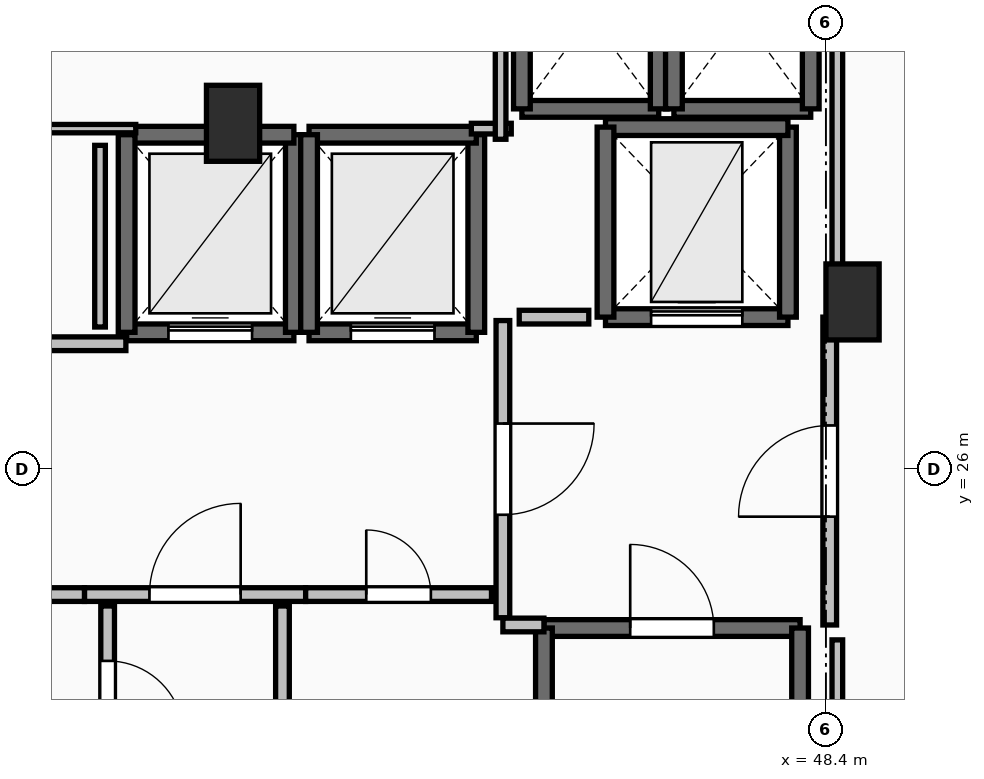
"""IFC4 building model, lengths in metres.
Left out: names, types, materials, properties, quantities, classifications, styles, units other than length and angle.
Written with IfcOpenShell. Run it as: python <this file> out.ifc"""

import sys

from ifc_helpers import new_model, si_unit, direction, frame, frame_2d, origin, origin_2d, place, context, subcontext, project, spatial, rectangle, extrude, element, fill, save


model = new_model("IFC4")
c1 = context("Model", 3, precision=1e-05, world=origin(), true_north=direction((0.0, 1.0)))
c2 = subcontext(c1, "Body", "Model", "MODEL_VIEW")
j1 = project(units=[si_unit("LENGTHUNIT", "METRE"), si_unit("PLANEANGLEUNIT", "RADIAN")], contexts=[c1])
p1 = place(None, origin())
s1 = spatial("IfcSite", under=j1, at=p1, CompositionType="ELEMENT")
p2 = place(p1, origin())
s2 = spatial("IfcBuilding", under=s1, at=p2, CompositionType="ELEMENT")
p3 = place(p2, frame((0.0, 0.0, 266.2)))
s3 = spatial("IfcBuildingStorey", under=s2, at=p3, CompositionType="ELEMENT", Elevation=266.2)
for number, where, z_axis, x_axis in (
    (1, (48.75, 28.2, 0.0), (0.0, 0.0, 1.0), (1.0, 0.0, 0.0)),
    (2, (40.6, 30.55, 0.0), (0.0, 0.0, 1.0), (1.0, 0.0, 0.0)),
):
    element("IfcColumn", number, at=place(p3, frame(where, z_axis=z_axis, x_axis=x_axis)), inside=s3, PredefinedType="PILASTER", context=c2, shape_type="SweptSolid", body=[
        extrude(rectangle(XDim=0.7, YDim=1.0, at=origin_2d()), origin(), (0.0, 0.0, 1.0), 3.55),
    ])
p4 = place(p3, frame((44.69, 23.91, 0.0), z_axis=(0.0, 0.0, 1.0), x_axis=(1.0, 0.0, 0.0)))
e3 = element("IfcWall", 3, at=p4, inside=s3, PredefinedType="SOLIDWALL", context=c2, shape_type="SweptSolid", body=[
    extrude(rectangle(XDim=3.37, YDim=0.22, at=frame_2d((1.685, 0.0))), origin(), (0.0, 0.0, 1.0), 3.29),
])
p5 = place(p4, frame((1.135, 0.0, 0.0)))
e4 = element("IfcOpeningElement", 4, at=p5, cuts=e3, PredefinedType="OPENING", context=c2, shape_type="SweptSolid", body=[
    extrude(rectangle(XDim=1.1, YDim=2.15, at=frame_2d((0.55, 1.075))), frame((0.0, 0.125, 0.0), z_axis=(0.0, -1.0, 0.0), x_axis=(1.0, 0.0, 0.0)), (0.0, 0.0, 1.0), 0.25),
])
for number, where, z_axis, x_axis in (
    (5, (48.06, 23.91, 0.0), (0.0, 0.0, 1.0), (0.0, -1.0, 0.0)),
    (6, (44.69, 16.49, 0.0), (0.0, 0.0, 1.0), (0.0, 1.0, 0.0)),
):
    element("IfcWall", number, at=place(p3, frame(where, z_axis=z_axis, x_axis=x_axis)), inside=s3, PredefinedType="SOLIDWALL", context=c2, shape_type="SweptSolid", body=[
        extrude(rectangle(XDim=7.42, YDim=0.22, at=frame_2d((3.71, 0.0))), origin(), (0.0, 0.0, 1.0), 3.29),
    ])
p6 = place(p3, frame((39.2, 27.8, 0.0), z_axis=(0.0, 0.0, 1.0), x_axis=(1.0, 0.0, 0.0)))
e7 = element("IfcWall", 7, at=p6, inside=s3, PredefinedType="SOLIDWALL", context=c2, shape_type="SweptSolid", body=[
    extrude(rectangle(XDim=2.2, YDim=0.22, at=frame_2d((1.1, 0.0))), origin(), (0.0, 0.0, 1.0), 3.29),
])
p7 = place(p6, frame((0.55, 0.0, 0.0)))
e8 = element("IfcOpeningElement", 8, at=p7, cuts=e7, PredefinedType="OPENING", context=c2, shape_type="SweptSolid", body=[
    extrude(rectangle(XDim=1.1, YDim=2.2, at=frame_2d((0.55, 1.1))), frame((0.0, 0.125, 0.0), z_axis=(0.0, -1.0, 0.0), x_axis=(1.0, 0.0, 0.0)), (0.0, 0.0, 1.0), 0.25),
])
p8 = place(p3, frame((41.4, 27.8, 0.0), z_axis=(0.0, 0.0, 1.0), x_axis=(0.0, 1.0, 0.0)))
e9 = element("IfcWall", 9, at=p8, inside=s3, PredefinedType="SOLIDWALL", context=c2, shape_type="SweptSolid", body=[
    extrude(rectangle(XDim=2.6, YDim=0.22, at=frame_2d((1.3, 0.0))), origin(), (0.0, 0.0, 1.0), 3.29),
])
p9 = place(p3, frame((41.4, 30.4, 0.0), z_axis=(0.0, 0.0, 1.0), x_axis=(-1.0, 0.0, 0.0)))
e10 = element("IfcWall", 10, at=p9, inside=s3, PredefinedType="SOLIDWALL", context=c2, shape_type="SweptSolid", body=[
    extrude(rectangle(XDim=2.2, YDim=0.22, at=frame_2d((1.1, 0.0))), origin(), (0.0, 0.0, 1.0), 3.29),
])
p10 = place(p3, frame((39.2, 30.4, 0.0), z_axis=(0.0, 0.0, 1.0), x_axis=(0.0, -1.0, 0.0)))
e11 = element("IfcWall", 11, at=p10, inside=s3, PredefinedType="SOLIDWALL", context=c2, shape_type="SweptSolid", body=[
    extrude(rectangle(XDim=2.6, YDim=0.22, at=frame_2d((1.3, 0.0))), origin(), (0.0, 0.0, 1.0), 3.29),
])
p11 = place(p3, frame((41.6, 27.8, 0.0), z_axis=(0.0, 0.0, 1.0), x_axis=(1.0, 0.0, 0.0)))
e12 = element("IfcWall", 12, at=p11, inside=s3, PredefinedType="SOLIDWALL", context=c2, shape_type="SweptSolid", body=[
    extrude(rectangle(XDim=2.2, YDim=0.22, at=frame_2d((1.1, 0.0))), origin(), (0.0, 0.0, 1.0), 3.29),
])
p12 = place(p11, frame((0.55, 0.0, 0.0)))
e13 = element("IfcOpeningElement", 13, at=p12, cuts=e12, PredefinedType="OPENING", context=c2, shape_type="SweptSolid", body=[
    extrude(rectangle(XDim=1.1, YDim=2.2, at=frame_2d((0.55, 1.1))), frame((0.0, 0.125, 0.0), z_axis=(0.0, -1.0, 0.0), x_axis=(1.0, 0.0, 0.0)), (0.0, 0.0, 1.0), 0.25),
])
p13 = place(p3, frame((43.8, 27.8, 0.0), z_axis=(0.0, 0.0, 1.0), x_axis=(0.0, 1.0, 0.0)))
e14 = element("IfcWall", 14, at=p13, inside=s3, PredefinedType="SOLIDWALL", context=c2, shape_type="SweptSolid", body=[
    extrude(rectangle(XDim=2.6, YDim=0.22, at=frame_2d((1.3, 0.0))), origin(), (0.0, 0.0, 1.0), 3.29),
])
p14 = place(p3, frame((43.8, 30.4, 0.0), z_axis=(0.0, 0.0, 1.0), x_axis=(-1.0, 0.0, 0.0)))
e15 = element("IfcWall", 15, at=p14, inside=s3, PredefinedType="SOLIDWALL", context=c2, shape_type="SweptSolid", body=[
    extrude(rectangle(XDim=2.2, YDim=0.22, at=frame_2d((1.1, 0.0))), origin(), (0.0, 0.0, 1.0), 3.29),
])
p15 = place(p3, frame((41.6, 30.4, 0.0), z_axis=(0.0, 0.0, 1.0), x_axis=(0.0, -1.0, 0.0)))
e16 = element("IfcWall", 16, at=p15, inside=s3, PredefinedType="SOLIDWALL", context=c2, shape_type="SweptSolid", body=[
    extrude(rectangle(XDim=2.6, YDim=0.22, at=frame_2d((1.3, 0.0))), origin(), (0.0, 0.0, 1.0), 3.29),
])
p16 = place(p3, frame((44.4, 30.74, 0.0), z_axis=(0.0, 0.0, 1.0), x_axis=(1.0, 0.0, 0.0)))
e17 = element("IfcWall", 17, at=p16, inside=s3, PredefinedType="SOLIDWALL", context=c2, shape_type="SweptSolid", body=[
    extrude(rectangle(XDim=1.8, YDim=0.22, at=frame_2d((0.9, 0.0))), origin(), (0.0, 0.0, 1.0), 3.29),
])
for number, where, z_axis, x_axis in (
    (18, (46.2, 30.74, 0.0), (0.0, 0.0, 1.0), (0.0, 1.0, 0.0)),
    (19, (44.4, 33.16, 0.0), (0.0, 0.0, 1.0), (0.0, -1.0, 0.0)),
):
    element("IfcWall", number, at=place(p3, frame(where, z_axis=z_axis, x_axis=x_axis)), inside=s3, PredefinedType="SOLIDWALL", context=c2, shape_type="SweptSolid", body=[
        extrude(rectangle(XDim=2.42, YDim=0.22, at=frame_2d((1.21, 0.0))), origin(), (0.0, 0.0, 1.0), 3.29),
    ])
p17 = place(p3, frame((46.4, 30.74, 0.0), z_axis=(0.0, 0.0, 1.0), x_axis=(1.0, 0.0, 0.0)))
e20 = element("IfcWall", 20, at=p17, inside=s3, PredefinedType="SOLIDWALL", context=c2, shape_type="SweptSolid", body=[
    extrude(rectangle(XDim=1.8, YDim=0.22, at=frame_2d((0.9, 0.0))), origin(), (0.0, 0.0, 1.0), 3.29),
])
for number, where, z_axis, x_axis in (
    (21, (48.2, 30.74, 0.0), (0.0, 0.0, 1.0), (0.0, 1.0, 0.0)),
    (22, (46.4, 33.16, 0.0), (0.0, 0.0, 1.0), (0.0, -1.0, 0.0)),
):
    element("IfcWall", number, at=place(p3, frame(where, z_axis=z_axis, x_axis=x_axis)), inside=s3, PredefinedType="SOLIDWALL", context=c2, shape_type="SweptSolid", body=[
        extrude(rectangle(XDim=2.42, YDim=0.22, at=frame_2d((1.21, 0.0))), origin(), (0.0, 0.0, 1.0), 3.29),
    ])
p18 = place(p3, frame((45.5, 28.0, 0.0), z_axis=(0.0, 0.0, 1.0), x_axis=(1.0, 0.0, 0.0)))
e23 = element("IfcWall", 23, at=p18, inside=s3, PredefinedType="SHEAR", context=c2, shape_type="SweptSolid", body=[
    extrude(rectangle(XDim=2.4, YDim=0.22, at=frame_2d((1.2, 0.0))), origin(), (0.0, 0.0, 1.0), 3.29),
])
p19 = place(p18, frame((0.6, 0.0, 0.0)))
e24 = element("IfcOpeningElement", 24, at=p19, cuts=e23, PredefinedType="OPENING", context=c2, shape_type="SweptSolid", body=[
    extrude(rectangle(XDim=1.2, YDim=2.2, at=frame_2d((0.6, 1.1))), frame((0.0, 0.125, 0.0), z_axis=(0.0, -1.0, 0.0), x_axis=(1.0, 0.0, 0.0)), (0.0, 0.0, 1.0), 0.25),
])
p20 = place(p3, frame((47.9, 28.0, 0.0), z_axis=(0.0, 0.0, 1.0), x_axis=(0.0, 1.0, 0.0)))
e25 = element("IfcWall", 25, at=p20, inside=s3, PredefinedType="SHEAR", context=c2, shape_type="SweptSolid", body=[
    extrude(rectangle(XDim=2.5, YDim=0.22, at=frame_2d((1.25, 0.0))), origin(), (0.0, 0.0, 1.0), 3.29),
])
p21 = place(p3, frame((47.9, 30.5, 0.0), z_axis=(0.0, 0.0, 1.0), x_axis=(-1.0, 0.0, 0.0)))
e26 = element("IfcWall", 26, at=p21, inside=s3, PredefinedType="SHEAR", context=c2, shape_type="SweptSolid", body=[
    extrude(rectangle(XDim=2.4, YDim=0.22, at=frame_2d((1.2, 0.0))), origin(), (0.0, 0.0, 1.0), 3.29),
])
p22 = place(p3, frame((45.5, 30.5, 0.0), z_axis=(0.0, 0.0, 1.0), x_axis=(0.0, -1.0, 0.0)))
e27 = element("IfcWall", 27, at=p22, inside=s3, PredefinedType="SHEAR", context=c2, shape_type="SweptSolid", body=[
    extrude(rectangle(XDim=2.5, YDim=0.22, at=frame_2d((1.25, 0.0))), origin(), (0.0, 0.0, 1.0), 3.29),
])
p23 = place(p3, frame((44.15, 27.955, 0.0), z_axis=(0.0, 0.0, 1.0), x_axis=(0.0, -1.0, 0.0)))
e28 = element("IfcWall", 28, at=p23, inside=s3, PredefinedType="PARTITIONING", context=c2, shape_type="SweptSolid", body=[
    extrude(rectangle(XDim=3.91, YDim=0.18, at=frame_2d((1.955, 0.0))), origin(), (0.0, 0.0, 1.0), 3.29),
])
p24 = place(p23, frame((1.355, 0.0, 0.0)))
e29 = element("IfcOpeningElement", 29, at=p24, cuts=e28, PredefinedType="OPENING", context=c2, shape_type="SweptSolid", body=[
    extrude(rectangle(XDim=1.2, YDim=2.15, at=frame_2d((0.6, 1.075))), frame((0.0, 0.105, 0.0), z_axis=(0.0, -1.0, 0.0), x_axis=(1.0, 0.0, 0.0)), (0.0, 0.0, 1.0), 0.21),
])
p25 = place(p3, frame((44.15, 23.95, 0.0), z_axis=(0.0, 0.0, 1.0), x_axis=(1.0, 0.0, 0.0)))
e30 = element("IfcWall", 30, at=p25, inside=s3, PredefinedType="PARTITIONING", context=c2, shape_type="SweptSolid", body=[
    extrude(rectangle(XDim=0.54, YDim=0.18, at=frame_2d((0.27, 0.0))), origin(), (0.0, 0.0, 1.0), 3.29),
])
p26 = place(p3, frame((48.45, 23.95, 0.0), z_axis=(0.0, 0.0, 1.0), x_axis=(0.0, 1.0, 0.0)))
e31 = element("IfcWall", 31, at=p26, inside=s3, PredefinedType="PARTITIONING", context=c2, shape_type="SweptSolid", body=[
    extrude(rectangle(XDim=4.05, YDim=0.18, at=frame_2d((2.025, 0.0))), origin(), (0.0, 0.0, 1.0), 3.29),
])
p27 = place(p26, frame((1.425, 0.0, 0.0)))
e32 = element("IfcOpeningElement", 32, at=p27, cuts=e31, PredefinedType="OPENING", context=c2, shape_type="SweptSolid", body=[
    extrude(rectangle(XDim=1.2, YDim=2.15, at=frame_2d((0.6, 1.075))), frame((0.0, 0.105, 0.0), z_axis=(0.0, -1.0, 0.0), x_axis=(1.0, 0.0, 0.0)), (0.0, 0.0, 1.0), 0.21),
])
p28 = place(p3, frame((38.645, 24.35, 0.0), z_axis=(0.0, 0.0, 1.0), x_axis=(1.0, 0.0, 0.0)))
e33 = element("IfcWall", 33, at=p28, inside=s3, PredefinedType="PARTITIONING", context=c2, shape_type="SweptSolid", body=[
    extrude(rectangle(XDim=2.91, YDim=0.18, at=frame_2d((1.455, 0.0))), origin(), (0.0, 0.0, 1.0), 3.29),
])
p29 = place(p28, frame((0.855, 0.0, 0.0)))
e34 = element("IfcOpeningElement", 34, at=p29, cuts=e33, PredefinedType="OPENING", context=c2, shape_type="SweptSolid", body=[
    extrude(rectangle(XDim=1.2, YDim=2.15, at=frame_2d((0.6, 1.075))), frame((0.0, 0.105, 0.0), z_axis=(0.0, -1.0, 0.0), x_axis=(1.0, 0.0, 0.0)), (0.0, 0.0, 1.0), 0.21),
])
p30 = place(p3, frame((41.555, 24.35, 0.0), z_axis=(0.0, 0.0, 1.0), x_axis=(1.0, 0.0, 0.0)))
e35 = element("IfcWall", 35, at=p30, inside=s3, PredefinedType="PARTITIONING", context=c2, shape_type="SweptSolid", body=[
    extrude(rectangle(XDim=2.445, YDim=0.18, at=frame_2d((1.223, 0.0))), origin(), (0.0, 0.0, 1.0), 3.29),
])
p31 = place(p30, frame((0.798, 0.0, 0.0)))
e36 = element("IfcOpeningElement", 36, at=p31, cuts=e35, PredefinedType="OPENING", context=c2, shape_type="SweptSolid", body=[
    extrude(rectangle(XDim=0.85, YDim=2.1, at=frame_2d((0.425, 1.05))), frame((0.0, 0.105, 0.0), z_axis=(0.0, -1.0, 0.0), x_axis=(1.0, 0.0, 0.0)), (0.0, 0.0, 1.0), 0.21),
])
p32 = place(p3, frame((39.19, 27.65, 0.0), z_axis=(0.0, 0.0, 1.0), x_axis=(-1.0, 0.0, 0.0)))
e37 = element("IfcWall", 37, at=p32, inside=s3, PredefinedType="PARTITIONING", context=c2, shape_type="SweptSolid", body=[
    extrude(rectangle(XDim=7.19, YDim=0.18, at=frame_2d((3.595, 0.0))), origin(), (0.0, 0.0, 1.0), 3.29),
])
p33 = place(p32, frame((3.095, 0.0, 0.0)))
e38 = element("IfcOpeningElement", 38, at=p33, cuts=e37, PredefinedType="OPENING", context=c2, shape_type="SweptSolid", body=[
    extrude(rectangle(XDim=1.0, YDim=2.15, at=frame_2d((0.5, 1.075))), frame((0.0, 0.105, 0.0), z_axis=(0.0, -1.0, 0.0), x_axis=(1.0, 0.0, 0.0)), (0.0, 0.0, 1.0), 0.21),
])
p34 = place(p3, frame((35.81, 24.35, 0.0), z_axis=(0.0, 0.0, 1.0), x_axis=(1.0, 0.0, 0.0)))
e39 = element("IfcWall", 39, at=p34, inside=s3, PredefinedType="PARTITIONING", context=c2, shape_type="SweptSolid", body=[
    extrude(rectangle(XDim=2.835, YDim=0.18, at=frame_2d((1.417, 0.0))), origin(), (0.0, 0.0, 1.0), 3.29),
])
p35 = place(p34, frame((0.917, 0.0, 0.0)))
e40 = element("IfcOpeningElement", 40, at=p35, cuts=e39, PredefinedType="OPENING", context=c2, shape_type="SweptSolid", body=[
    extrude(rectangle(XDim=1.0, YDim=2.15, at=frame_2d((0.5, 1.075))), frame((0.0, 0.105, 0.0), z_axis=(0.0, -1.0, 0.0), x_axis=(1.0, 0.0, 0.0)), (0.0, 0.0, 1.0), 0.21),
])
p36 = place(p3, frame((41.25, 20.305, 0.0), z_axis=(0.0, 0.0, 1.0), x_axis=(0.0, 1.0, 0.0)))
e41 = element("IfcWall", 41, at=p36, inside=s3, PredefinedType="PARTITIONING", context=c2, shape_type="SweptSolid", body=[
    extrude(rectangle(XDim=3.895, YDim=0.18, at=frame_2d((1.948, 0.0))), origin(), (0.0, 0.0, 1.0), 2.482),
])
p37 = place(p36, frame((1.522, 0.0, 0.0)))
e42 = element("IfcOpeningElement", 42, at=p37, cuts=e41, PredefinedType="OPENING", context=c2, shape_type="SweptSolid", body=[
    extrude(rectangle(XDim=0.85, YDim=2.1, at=frame_2d((0.425, 1.05))), frame((0.0, 0.105, 0.0), z_axis=(0.0, -1.0, 0.0), x_axis=(1.0, 0.0, 0.0)), (0.0, 0.0, 1.0), 0.21),
])
p38 = place(p3, frame((38.95, 24.2, 0.0), z_axis=(0.0, 0.0, 1.0), x_axis=(0.0, -1.0, 0.0)))
e43 = element("IfcWall", 43, at=p38, inside=s3, PredefinedType="PARTITIONING", context=c2, shape_type="SweptSolid", body=[
    extrude(rectangle(XDim=2.445, YDim=0.18, at=frame_2d((1.223, 0.0))), origin(), (0.0, 0.0, 1.0), 2.482),
])
p39 = place(p38, frame((0.722, 0.0, 0.0)))
e44 = element("IfcOpeningElement", 44, at=p39, cuts=e43, PredefinedType="OPENING", context=c2, shape_type="SweptSolid", body=[
    extrude(rectangle(XDim=1.0, YDim=2.15, at=frame_2d((0.5, 1.075))), frame((0.0, 0.105, 0.0), z_axis=(0.0, -1.0, 0.0), x_axis=(1.0, 0.0, 0.0)), (0.0, 0.0, 1.0), 0.21),
])
p40 = place(p3, frame((37.365, 30.48, 0.0), z_axis=(0.0, 0.0, 1.0), x_axis=(1.0, 0.0, 0.0)))
e45 = element("IfcWall", 45, at=p40, inside=s3, PredefinedType="PARTITIONING", context=c2, shape_type="SweptSolid", body=[
    extrude(rectangle(XDim=1.955, YDim=0.11, at=frame_2d((0.978, 0.0))), origin(), (0.0, 0.0, 1.0), 2.482),
])
p41 = place(p3, frame((45.28, 28.0, 0.0), z_axis=(0.0, 0.0, 1.0), x_axis=(-1.0, 0.0, 0.0)))
e46 = element("IfcWall", 46, at=p41, inside=s3, PredefinedType="PARTITIONING", context=c2, shape_type="SweptSolid", body=[
    extrude(rectangle(XDim=0.915, YDim=0.18, at=frame_2d((0.458, 0.0))), origin(), (0.0, 0.0, 1.0), 3.29),
])
p42 = place(p3, frame((43.735, 30.48, 0.0), z_axis=(0.0, 0.0, 1.0), x_axis=(1.0, 0.0, 0.0)))
e47 = element("IfcWall", 47, at=p42, inside=s3, PredefinedType="PARTITIONING", context=c2, shape_type="SweptSolid", body=[
    extrude(rectangle(XDim=0.525, YDim=0.14, at=frame_2d((0.262, 0.0))), origin(), (0.0, 0.0, 1.0), 3.29),
])
p43 = place(p3, frame((44.12, 30.34, 0.0), z_axis=(0.0, 0.0, 1.0), x_axis=(0.0, 1.0, 0.0)))
e48 = element("IfcWall", 48, at=p43, inside=s3, PredefinedType="PARTITIONING", context=c2, shape_type="SweptSolid", body=[
    extrude(rectangle(XDim=2.66, YDim=0.14, at=frame_2d((1.33, 0.0))), origin(), (0.0, 0.0, 1.0), 3.29),
])
p44 = place(p3, frame((38.85, 27.87, 0.0), z_axis=(0.0, 0.0, 1.0), x_axis=(0.0, 1.0, 0.0)))
e49 = element("IfcWall", 49, at=p44, inside=s3, PredefinedType="PARTITIONING", context=c2, shape_type="SweptSolid", body=[
    extrude(rectangle(XDim=2.39, YDim=0.14, at=frame_2d((1.195, 0.0))), origin(), (0.0, 0.0, 1.0), 3.29),
])
p45 = place(p3, frame((48.55, 16.24, 0.0), z_axis=(0.0, 0.0, 1.0), x_axis=(0.0, 1.0, 0.0)))
e50 = element("IfcWall", 50, at=p45, inside=s3, PredefinedType="PARTITIONING", context=c2, shape_type="SweptSolid", body=[
    extrude(rectangle(XDim=7.514, YDim=0.14, at=frame_2d((3.757, 0.0))), origin(), (0.0, 0.0, 1.0), 2.482),
])
p46 = place(p3, frame((48.55, 28.196, 0.0), z_axis=(0.0, 0.0, 1.0), x_axis=(0.0, 1.0, 0.0)))
e51 = element("IfcWall", 51, at=p46, inside=s3, PredefinedType="PARTITIONING", context=c2, shape_type="SweptSolid", body=[
    extrude(rectangle(XDim=5.254, YDim=0.14, at=frame_2d((2.627, 0.0))), origin(), (0.0, 0.0, 1.0), 2.482),
])
p47 = place(p5, origin())
e52 = element("IfcDoor", 52, at=p47, inside=s3, OperationType="SINGLE_SWING_LEFT", PredefinedType="DOOR", context=c2, shape_type="SweptSolid", body=[
    extrude(rectangle(XDim=1.1, YDim=2.15, at=frame_2d((0.55, 1.075))), frame((0.0, 0.025, 0.0), z_axis=(0.0, -1.0, 0.0), x_axis=(1.0, 0.0, 0.0)), (0.0, 0.0, 1.0), 0.05),
])
fill(e4, e52)
p48 = place(p7, origin())
e53 = element("IfcDoor", 53, at=p48, inside=s3, OperationType="SLIDING_TO_LEFT", PredefinedType="DOOR", context=c2, shape_type="SweptSolid", body=[
    extrude(rectangle(XDim=1.1, YDim=2.2, at=frame_2d((0.55, 1.1))), frame((0.0, 0.025, 0.0), z_axis=(0.0, -1.0, 0.0), x_axis=(1.0, 0.0, 0.0)), (0.0, 0.0, 1.0), 0.05),
])
fill(e8, e53)
p49 = place(p12, origin())
e54 = element("IfcDoor", 54, at=p49, inside=s3, OperationType="SLIDING_TO_LEFT", PredefinedType="DOOR", context=c2, shape_type="SweptSolid", body=[
    extrude(rectangle(XDim=1.1, YDim=2.2, at=frame_2d((0.55, 1.1))), frame((0.0, 0.025, 0.0), z_axis=(0.0, -1.0, 0.0), x_axis=(1.0, 0.0, 0.0)), (0.0, 0.0, 1.0), 0.05),
])
fill(e13, e54)
p50 = place(p19, origin())
e55 = element("IfcDoor", 55, at=p50, inside=s3, OperationType="SLIDING_TO_LEFT", PredefinedType="DOOR", context=c2, shape_type="SweptSolid", body=[
    extrude(rectangle(XDim=1.2, YDim=2.2, at=frame_2d((0.6, 1.1))), frame((0.0, 0.025, 0.0), z_axis=(0.0, -1.0, 0.0), x_axis=(1.0, 0.0, 0.0)), (0.0, 0.0, 1.0), 0.05),
])
fill(e24, e55)
p51 = place(p24, origin())
e56 = element("IfcDoor", 56, at=p51, inside=s3, OperationType="SINGLE_SWING_LEFT", PredefinedType="DOOR", context=c2, shape_type="SweptSolid", body=[
    extrude(rectangle(XDim=1.2, YDim=2.15, at=frame_2d((0.6, 1.075))), frame((0.0, 0.025, 0.0), z_axis=(0.0, -1.0, 0.0), x_axis=(1.0, 0.0, 0.0)), (0.0, 0.0, 1.0), 0.05),
])
fill(e29, e56)
p52 = place(p27, origin())
e57 = element("IfcDoor", 57, at=p52, inside=s3, OperationType="SINGLE_SWING_LEFT", PredefinedType="DOOR", context=c2, shape_type="SweptSolid", body=[
    extrude(rectangle(XDim=1.2, YDim=2.15, at=frame_2d((0.6, 1.075))), frame((0.0, 0.025, 0.0), z_axis=(0.0, -1.0, 0.0), x_axis=(1.0, 0.0, 0.0)), (0.0, 0.0, 1.0), 0.05),
])
fill(e32, e57)
p53 = place(p29, origin())
e58 = element("IfcDoor", 58, at=p53, inside=s3, OperationType="SINGLE_SWING_RIGHT", PredefinedType="DOOR", context=c2, shape_type="SweptSolid", body=[
    extrude(rectangle(XDim=1.2, YDim=2.15, at=frame_2d((0.6, 1.075))), frame((0.0, 0.025, 0.0), z_axis=(0.0, -1.0, 0.0), x_axis=(1.0, 0.0, 0.0)), (0.0, 0.0, 1.0), 0.05),
])
fill(e34, e58)
p54 = place(p31, origin())
e59 = element("IfcDoor", 59, at=p54, inside=s3, OperationType="SINGLE_SWING_LEFT", PredefinedType="DOOR", context=c2, shape_type="SweptSolid", body=[
    extrude(rectangle(XDim=0.85, YDim=2.1, at=frame_2d((0.425, 1.05))), frame((0.0, 0.025, 0.0), z_axis=(0.0, -1.0, 0.0), x_axis=(1.0, 0.0, 0.0)), (0.0, 0.0, 1.0), 0.05),
])
fill(e36, e59)
p55 = place(p39, origin())
e60 = element("IfcDoor", 60, at=p55, inside=s3, OperationType="SINGLE_SWING_RIGHT", PredefinedType="DOOR", context=c2, shape_type="SweptSolid", body=[
    extrude(rectangle(XDim=1.0, YDim=2.15, at=frame_2d((0.5, 1.075))), frame((0.0, 0.025, 0.0), z_axis=(0.0, -1.0, 0.0), x_axis=(1.0, 0.0, 0.0)), (0.0, 0.0, 1.0), 0.05),
])
fill(e44, e60)
save(model, sys.argv[1])
